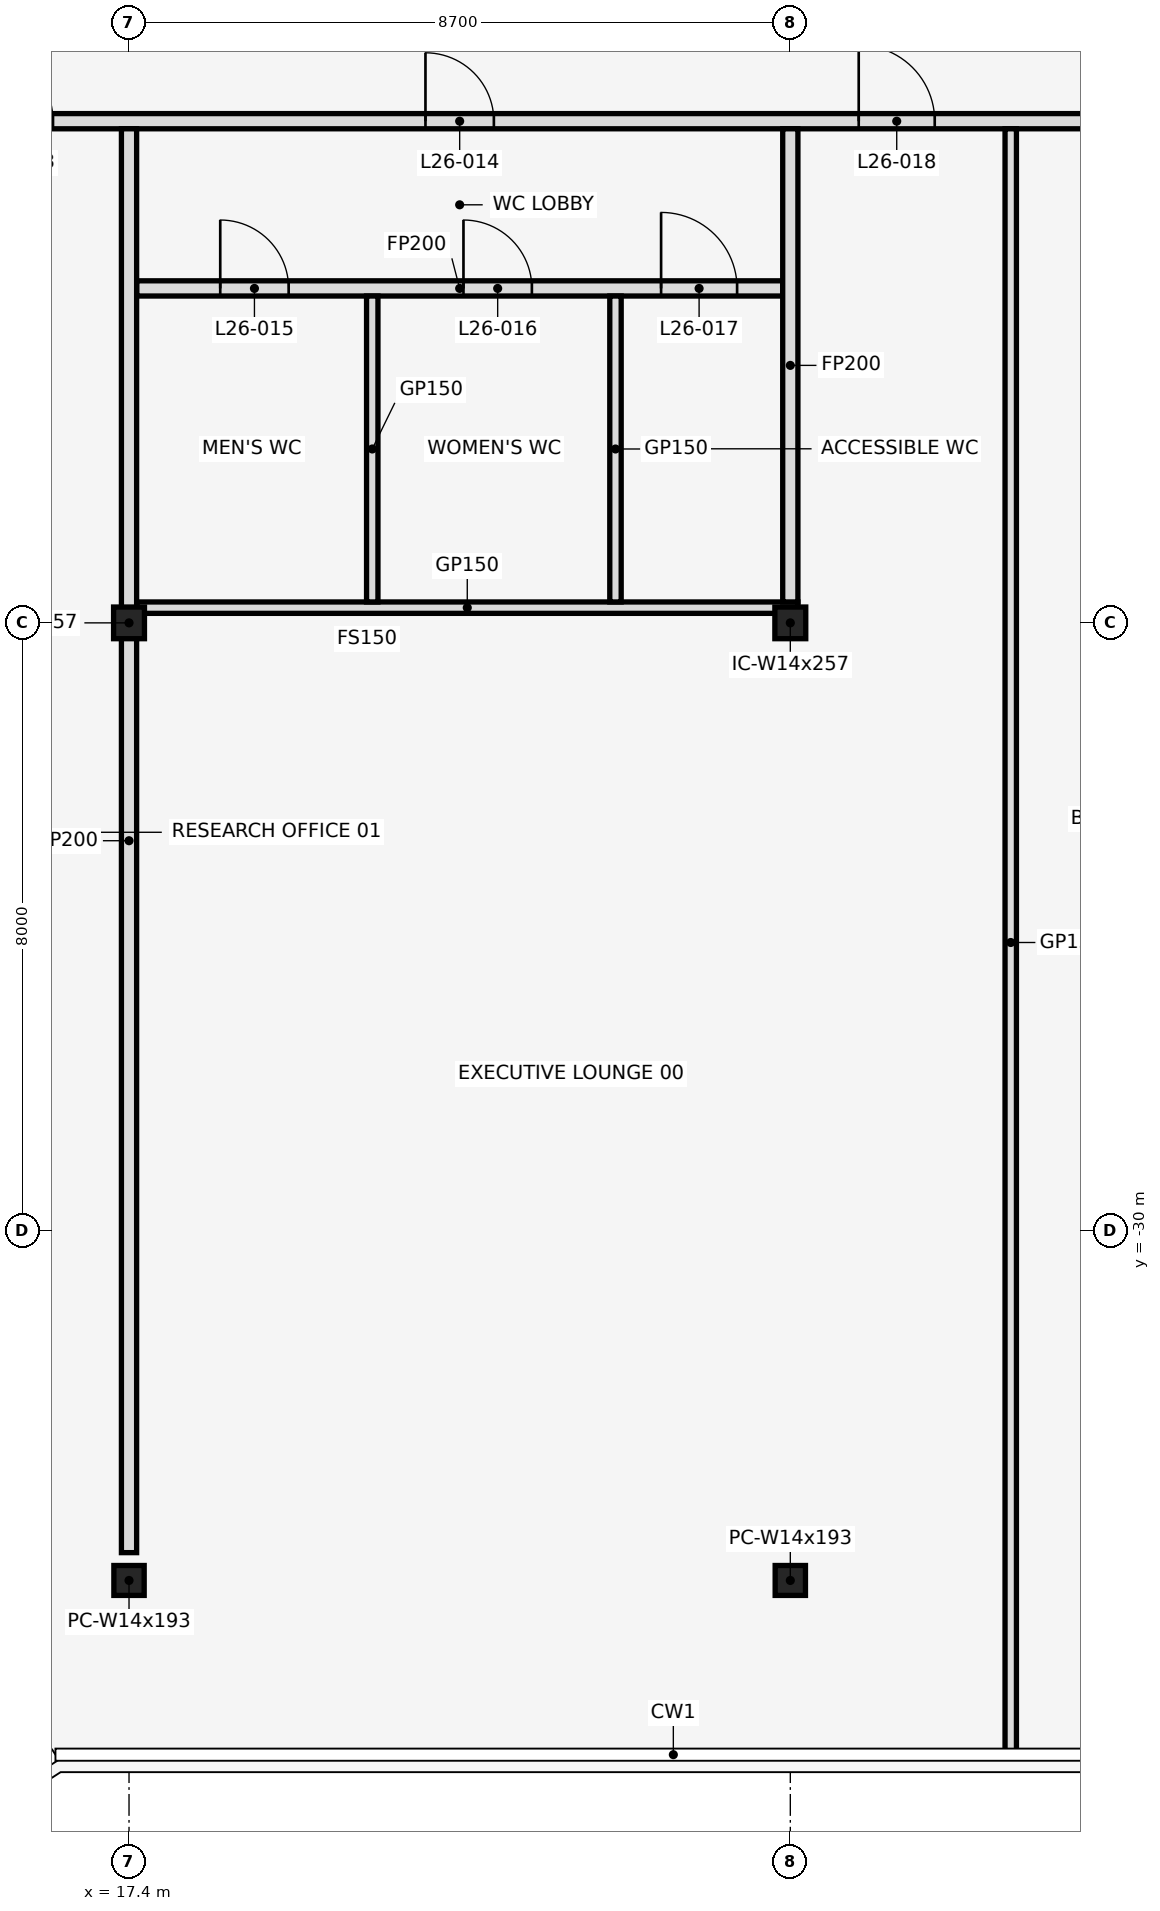
"""IFC4 building model, lengths in metres.
Left out: names, types, materials, properties, quantities, classifications, styles, units other than length and angle.
Written with IfcOpenShell. Run it as: python <this file> out.ifc"""

import sys

from ifc_helpers import new_model, si_unit, direction, frame, frame_2d, origin, origin_2d, place, context, subcontext, project, spatial, rectangle, i_section, extrude, element, fill, save


model = new_model("IFC4")
c1 = context("Model", 3, precision=1e-05, world=origin(), true_north=direction((0.0, 1.0)))
c2 = subcontext(c1, "Body", "Model", "MODEL_VIEW")
j1 = project(units=[si_unit("LENGTHUNIT", "METRE"), si_unit("PLANEANGLEUNIT", "RADIAN")], contexts=[c1])
p1 = place(None, origin())
s1 = spatial("IfcSite", under=j1, at=p1, CompositionType="ELEMENT")
p2 = place(p1, origin())
s2 = spatial("IfcBuilding", under=s1, at=p2, CompositionType="ELEMENT")
p3 = place(p2, frame((0.0, 0.0, 122.7)))
s3 = spatial("IfcBuildingStorey", under=s2, at=p3, CompositionType="ELEMENT", Elevation=122.7)
for number, where, z_axis, x_axis in (
    (1, (17.4, -34.598, 0.0), (0.0, 0.0, 1.0), (1.0, 0.0, 0.0)),
    (2, (26.1, -34.598, 0.0), (0.0, 0.0, 1.0), (1.0, 0.0, 0.0)),
):
    element("IfcColumn", number, at=place(p3, frame(where, z_axis=z_axis, x_axis=x_axis)), inside=s3, PredefinedType="COLUMN", context=c2, shape_type="SweptSolid", body=[
        extrude(i_section(OverallWidth=0.399, OverallDepth=0.394, WebThickness=0.023, FlangeThickness=0.037, at=origin_2d()), origin(), (0.0, 0.0, 1.0), 4.1),
    ])
for number, where, z_axis, x_axis in (
    (3, (17.4, -22.0, 0.0), (0.0, 0.0, 1.0), (1.0, 0.0, 0.0)),
    (4, (26.1, -22.0, 0.0), (0.0, 0.0, 1.0), (1.0, 0.0, 0.0)),
):
    element("IfcColumn", number, at=place(p3, frame(where, z_axis=z_axis, x_axis=x_axis)), inside=s3, PredefinedType="COLUMN", context=c2, shape_type="SweptSolid", body=[
        extrude(i_section(OverallWidth=0.406, OverallDepth=0.417, WebThickness=0.03, FlangeThickness=0.048, at=origin_2d()), origin(), (0.0, 0.0, 1.0), 4.1),
    ])
p4 = place(p3, frame((17.5, -21.8, 0.0), z_axis=(0.0, 0.0, 1.0), x_axis=(1.0, 0.0, 0.0)))
e5 = element("IfcWall", 5, at=p4, inside=s3, PredefinedType="PARTITIONING", context=c2, shape_type="SweptSolid", body=[
    extrude(rectangle(XDim=8.7, YDim=0.15, at=frame_2d((4.35, 0.0))), origin(), (0.0, 0.0, 1.0), 3.018),
])
p5 = place(p3, frame((17.5, -17.6, 0.0), z_axis=(0.0, 0.0, 1.0), x_axis=(1.0, 0.0, 0.0)))
e6 = element("IfcWall", 6, at=p5, inside=s3, PredefinedType="PARTITIONING", context=c2, shape_type="SweptSolid", body=[
    extrude(rectangle(XDim=8.5, YDim=0.2, at=frame_2d((4.25, 0.0))), origin(), (0.0, 0.0, 1.0), 3.018),
])
p6 = place(p5, frame((1.1, 0.0, 0.0)))
e7 = element("IfcOpeningElement", 7, at=p6, cuts=e6, PredefinedType="OPENING", context=c2, shape_type="SweptSolid", body=[
    extrude(rectangle(XDim=0.9, YDim=2.1, at=frame_2d((0.45, 1.05))), frame((0.0, 0.112, 0.0), z_axis=(0.0, -1.0, 0.0), x_axis=(1.0, 0.0, 0.0)), (0.0, 0.0, 1.0), 0.224),
])
p7 = place(p5, frame((4.3, 0.0, 0.0)))
e8 = element("IfcOpeningElement", 8, at=p7, cuts=e6, PredefinedType="OPENING", context=c2, shape_type="SweptSolid", body=[
    extrude(rectangle(XDim=0.9, YDim=2.1, at=frame_2d((0.45, 1.05))), frame((0.0, 0.112, 0.0), z_axis=(0.0, -1.0, 0.0), x_axis=(1.0, 0.0, 0.0)), (0.0, 0.0, 1.0), 0.224),
])
p8 = place(p5, frame((6.9, 0.0, 0.0)))
e9 = element("IfcOpeningElement", 9, at=p8, cuts=e6, PredefinedType="OPENING", context=c2, shape_type="SweptSolid", body=[
    extrude(rectangle(XDim=1.0, YDim=2.1, at=frame_2d((0.5, 1.05))), frame((0.0, 0.112, 0.0), z_axis=(0.0, -1.0, 0.0), x_axis=(1.0, 0.0, 0.0)), (0.0, 0.0, 1.0), 0.224),
])
p9 = place(p3, frame((-33.37, -15.4, 0.0), z_axis=(0.0, 0.0, 1.0), x_axis=(1.0, 0.0, 0.0)))
e10 = element("IfcWall", 10, at=p9, inside=s3, PredefinedType="PARTITIONING", context=c2, shape_type="SweptSolid", body=[
    extrude(rectangle(XDim=66.74, YDim=0.2, at=frame_2d((33.37, 0.0))), origin(), (0.0, 0.0, 1.0), 3.018),
])
p10 = place(p9, frame((1.7, 0.0, 0.0)))
e11 = element("IfcOpeningElement", 11, at=p10, cuts=e10, PredefinedType="OPENING", context=c2, shape_type="SweptSolid", body=[
    extrude(rectangle(XDim=1.0, YDim=2.1, at=frame_2d((0.5, 1.05))), frame((0.0, 0.112, 0.0), z_axis=(0.0, -1.0, 0.0), x_axis=(1.0, 0.0, 0.0)), (0.0, 0.0, 1.0), 0.224),
])
p11 = place(p9, frame((11.07, 0.0, 0.0)))
e12 = element("IfcOpeningElement", 12, at=p11, cuts=e10, PredefinedType="OPENING", context=c2, shape_type="SweptSolid", body=[
    extrude(rectangle(XDim=1.0, YDim=2.1, at=frame_2d((0.5, 1.05))), frame((0.0, 0.112, 0.0), z_axis=(0.0, -1.0, 0.0), x_axis=(1.0, 0.0, 0.0)), (0.0, 0.0, 1.0), 0.224),
])
p12 = place(p9, frame((20.87, 0.0, 0.0)))
e13 = element("IfcOpeningElement", 13, at=p12, cuts=e10, PredefinedType="OPENING", context=c2, shape_type="SweptSolid", body=[
    extrude(rectangle(XDim=1.8, YDim=2.1, at=frame_2d((0.9, 1.05))), frame((0.0, 0.112, 0.0), z_axis=(0.0, -1.0, 0.0), x_axis=(1.0, 0.0, 0.0)), (0.0, 0.0, 1.0), 0.224),
])
p13 = place(p9, frame((28.57, 0.0, 0.0)))
e14 = element("IfcOpeningElement", 14, at=p13, cuts=e10, PredefinedType="OPENING", context=c2, shape_type="SweptSolid", body=[
    extrude(rectangle(XDim=1.0, YDim=2.1, at=frame_2d((0.5, 1.05))), frame((0.0, 0.112, 0.0), z_axis=(0.0, -1.0, 0.0), x_axis=(1.0, 0.0, 0.0)), (0.0, 0.0, 1.0), 0.224),
])
p14 = place(p9, frame((36.77, 0.0, 0.0)))
e15 = element("IfcOpeningElement", 15, at=p14, cuts=e10, PredefinedType="OPENING", context=c2, shape_type="SweptSolid", body=[
    extrude(rectangle(XDim=1.8, YDim=2.1, at=frame_2d((0.9, 1.05))), frame((0.0, 0.112, 0.0), z_axis=(0.0, -1.0, 0.0), x_axis=(1.0, 0.0, 0.0)), (0.0, 0.0, 1.0), 0.224),
])
p15 = place(p9, frame((44.47, 0.0, 0.0)))
e16 = element("IfcOpeningElement", 16, at=p15, cuts=e10, PredefinedType="OPENING", context=c2, shape_type="SweptSolid", body=[
    extrude(rectangle(XDim=1.0, YDim=2.1, at=frame_2d((0.5, 1.05))), frame((0.0, 0.112, 0.0), z_axis=(0.0, -1.0, 0.0), x_axis=(1.0, 0.0, 0.0)), (0.0, 0.0, 1.0), 0.224),
])
p16 = place(p9, frame((48.77, 0.0, 0.0)))
e17 = element("IfcOpeningElement", 17, at=p16, cuts=e10, PredefinedType="OPENING", context=c2, shape_type="SweptSolid", body=[
    extrude(rectangle(XDim=1.0, YDim=2.1, at=frame_2d((0.5, 1.05))), frame((0.0, 0.112, 0.0), z_axis=(0.0, -1.0, 0.0), x_axis=(1.0, 0.0, 0.0)), (0.0, 0.0, 1.0), 0.224),
])
p17 = place(p9, frame((54.67, 0.0, 0.0)))
e18 = element("IfcOpeningElement", 18, at=p17, cuts=e10, PredefinedType="OPENING", context=c2, shape_type="SweptSolid", body=[
    extrude(rectangle(XDim=0.9, YDim=2.1, at=frame_2d((0.45, 1.05))), frame((0.0, 0.112, 0.0), z_axis=(0.0, -1.0, 0.0), x_axis=(1.0, 0.0, 0.0)), (0.0, 0.0, 1.0), 0.224),
])
p18 = place(p9, frame((60.37, 0.0, 0.0)))
e19 = element("IfcOpeningElement", 19, at=p18, cuts=e10, PredefinedType="OPENING", context=c2, shape_type="SweptSolid", body=[
    extrude(rectangle(XDim=1.0, YDim=2.1, at=frame_2d((0.5, 1.05))), frame((0.0, 0.112, 0.0), z_axis=(0.0, -1.0, 0.0), x_axis=(1.0, 0.0, 0.0)), (0.0, 0.0, 1.0), 0.224),
])
p19 = place(p9, frame((63.97, 0.0, 0.0)))
e20 = element("IfcOpeningElement", 20, at=p19, cuts=e10, PredefinedType="OPENING", context=c2, shape_type="SweptSolid", body=[
    extrude(rectangle(XDim=1.0, YDim=2.1, at=frame_2d((0.5, 1.05))), frame((0.0, 0.112, 0.0), z_axis=(0.0, -1.0, 0.0), x_axis=(1.0, 0.0, 0.0)), (0.0, 0.0, 1.0), 0.224),
])
p20 = place(p3, frame((17.4, -34.232, 0.0), z_axis=(0.0, 0.0, 1.0), x_axis=(0.0, 1.0, 0.0)))
e21 = element("IfcWall", 21, at=p20, inside=s3, PredefinedType="PARTITIONING", context=c2, shape_type="SweptSolid", body=[
    extrude(rectangle(XDim=18.732, YDim=0.2, at=frame_2d((9.366, 0.0))), origin(), (0.0, 0.0, 1.0), 3.018),
])
for number, where, z_axis, x_axis in (
    (22, (20.6, -21.725, 0.0), (0.0, 0.0, 1.0), (0.0, 1.0, 0.0)),
    (23, (23.8, -21.725, 0.0), (0.0, 0.0, 1.0), (0.0, 1.0, 0.0)),
):
    element("IfcWall", number, at=place(p3, frame(where, z_axis=z_axis, x_axis=x_axis)), inside=s3, PredefinedType="PARTITIONING", context=c2, shape_type="SweptSolid", body=[
        extrude(rectangle(XDim=4.025, YDim=0.15, at=frame_2d((2.013, 0.0))), origin(), (0.0, 0.0, 1.0), 3.018),
    ])
p21 = place(p3, frame((26.1, -21.725, 0.0), z_axis=(0.0, 0.0, 1.0), x_axis=(0.0, 1.0, 0.0)))
e24 = element("IfcWall", 24, at=p21, inside=s3, PredefinedType="PARTITIONING", context=c2, shape_type="SweptSolid", body=[
    extrude(rectangle(XDim=6.225, YDim=0.2, at=frame_2d((3.113, 0.0))), origin(), (0.0, 0.0, 1.0), 3.018),
])
p22 = place(p3, frame((29.0, -36.91, 0.0), z_axis=(0.0, 0.0, 1.0), x_axis=(0.0, 1.0, 0.0)))
e25 = element("IfcWall", 25, at=p22, inside=s3, PredefinedType="PARTITIONING", context=c2, shape_type="SweptSolid", body=[
    extrude(rectangle(XDim=21.41, YDim=0.15, at=frame_2d((10.705, 0.0))), origin(), (0.0, 0.0, 1.0), 3.018),
])
p23 = place(p17, frame((0.9, 0.0, 0.0), z_axis=(0.0, 0.0, 1.0), x_axis=(-1.0, 0.0, 0.0)))
e26 = element("IfcDoor", 26, at=p23, inside=s3, OperationType="SINGLE_SWING_RIGHT", PredefinedType="DOOR", context=c2, shape_type="SweptSolid", body=[
    extrude(rectangle(XDim=0.9, YDim=2.1, at=frame_2d((0.45, 1.05))), frame((0.0, 0.025, 0.0), z_axis=(0.0, -1.0, 0.0), x_axis=(1.0, 0.0, 0.0)), (0.0, 0.0, 1.0), 0.05),
])
fill(e18, e26)
p24 = place(p6, frame((0.9, 0.0, 0.0), z_axis=(0.0, 0.0, 1.0), x_axis=(-1.0, 0.0, 0.0)))
e27 = element("IfcDoor", 27, at=p24, inside=s3, OperationType="SINGLE_SWING_RIGHT", PredefinedType="DOOR", context=c2, shape_type="SweptSolid", body=[
    extrude(rectangle(XDim=0.9, YDim=2.1, at=frame_2d((0.45, 1.05))), frame((0.0, 0.025, 0.0), z_axis=(0.0, -1.0, 0.0), x_axis=(1.0, 0.0, 0.0)), (0.0, 0.0, 1.0), 0.05),
])
fill(e7, e27)
p25 = place(p7, frame((0.9, 0.0, 0.0), z_axis=(0.0, 0.0, 1.0), x_axis=(-1.0, 0.0, 0.0)))
e28 = element("IfcDoor", 28, at=p25, inside=s3, OperationType="SINGLE_SWING_LEFT", PredefinedType="DOOR", context=c2, shape_type="SweptSolid", body=[
    extrude(rectangle(XDim=0.9, YDim=2.1, at=frame_2d((0.45, 1.05))), frame((0.0, 0.025, 0.0), z_axis=(0.0, -1.0, 0.0), x_axis=(1.0, 0.0, 0.0)), (0.0, 0.0, 1.0), 0.05),
])
fill(e8, e28)
p26 = place(p8, frame((1.0, 0.0, 0.0), z_axis=(0.0, 0.0, 1.0), x_axis=(-1.0, 0.0, 0.0)))
e29 = element("IfcDoor", 29, at=p26, inside=s3, OperationType="SINGLE_SWING_RIGHT", PredefinedType="DOOR", context=c2, shape_type="SweptSolid", body=[
    extrude(rectangle(XDim=1.0, YDim=2.1, at=frame_2d((0.5, 1.05))), frame((0.0, 0.025, 0.0), z_axis=(0.0, -1.0, 0.0), x_axis=(1.0, 0.0, 0.0)), (0.0, 0.0, 1.0), 0.05),
])
fill(e9, e29)
p27 = place(p18, frame((1.0, 0.0, 0.0), z_axis=(0.0, 0.0, 1.0), x_axis=(-1.0, 0.0, 0.0)))
e30 = element("IfcDoor", 30, at=p27, inside=s3, OperationType="SINGLE_SWING_RIGHT", PredefinedType="DOOR", context=c2, shape_type="SweptSolid", body=[
    extrude(rectangle(XDim=1.0, YDim=2.1, at=frame_2d((0.5, 1.05))), frame((0.0, 0.025, 0.0), z_axis=(0.0, -1.0, 0.0), x_axis=(1.0, 0.0, 0.0)), (0.0, 0.0, 1.0), 0.05),
])
fill(e19, e30)
save(model, sys.argv[1])
